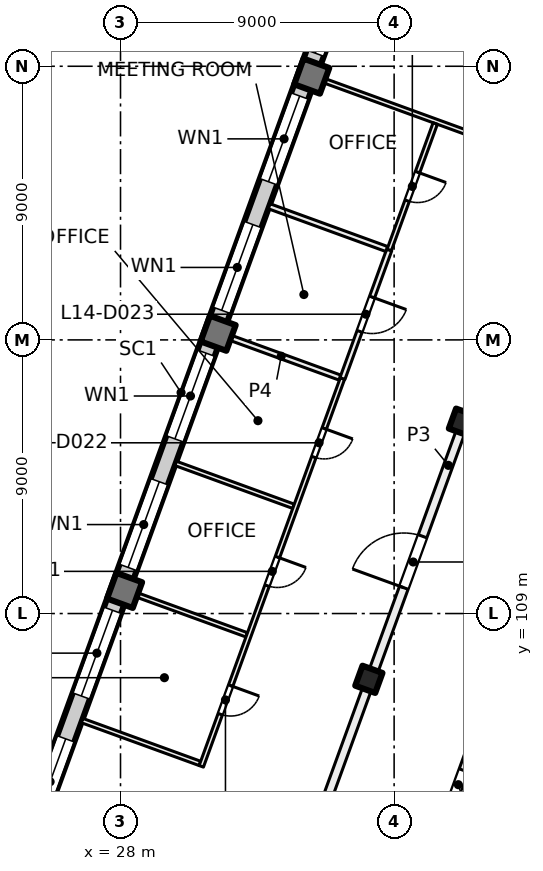
"""IFC4 building model, lengths in metres.
Left out: names, types, materials, properties, quantities, classifications, styles, units other than length and angle.
Written with IfcOpenShell. Run it as: python <this file> out.ifc"""

import sys

from ifc_helpers import new_model, si_unit, direction, frame, frame_2d, origin, origin_2d, place, context, subcontext, project, spatial, rectangle, extrude, element, fill, save


model = new_model("IFC4")
c1 = context("Model", 3, precision=1e-05, world=origin(), true_north=direction((0.0, 1.0)))
c2 = subcontext(c1, "Body", "Model", "MODEL_VIEW")
j1 = project(units=[si_unit("LENGTHUNIT", "METRE"), si_unit("PLANEANGLEUNIT", "RADIAN")], contexts=[c1])
p1 = place(None, origin())
s1 = spatial("IfcSite", under=j1, at=p1, CompositionType="ELEMENT")
p2 = place(p1, origin())
s2 = spatial("IfcBuilding", under=s1, at=p2, CompositionType="ELEMENT")
p3 = place(p2, frame((0.0, 0.0, 63.5)))
s3 = spatial("IfcBuildingStorey", under=s2, at=p3, CompositionType="ELEMENT", Elevation=63.5)
for number, where, z_axis, x_axis in (
    (1, (39.247, 115.293, 0.0), (0.0, 0.0, 1.0), (-0.342, -0.94, 0.0)),
    (2, (36.169, 106.836, 0.0), (0.0, 0.0, 1.0), (-0.342, -0.94, 0.0)),
):
    element("IfcColumn", number, at=place(p3, frame(where, z_axis=z_axis, x_axis=x_axis)), inside=s3, PredefinedType="COLUMN", context=c2, shape_type="SweptSolid", body=[
        extrude(rectangle(XDim=0.7, YDim=0.7, at=origin_2d()), origin(), (0.0, 0.0, 1.0), 4.0),
    ])
for number, where, z_axis, x_axis in (
    (3, (34.291, 126.675, 0.0), (0.0, 0.0, 1.0), (-0.342, -0.94, 0.0)),
    (4, (31.212, 118.218, 0.0), (0.0, 0.0, 1.0), (-0.342, -0.94, 0.0)),
    (5, (28.134, 109.76, 0.0), (0.0, 0.0, 1.0), (-0.342, -0.94, 0.0)),
):
    element("IfcColumn", number, at=place(p3, frame(where, z_axis=z_axis, x_axis=x_axis)), inside=s3, PredefinedType="COLUMN", context=c2, shape_type="SweptSolid", body=[
        extrude(rectangle(XDim=0.9, YDim=0.9, at=origin_2d()), origin(), (0.0, 0.0, 1.0), 4.0),
    ])
p4 = place(p3, frame((24.666, 100.669, 0.0), z_axis=(0.0, 0.0, 1.0), x_axis=(0.34201964167, 0.939692803373, 0.0)))
e6 = element("IfcWall", 6, at=p4, inside=s3, PredefinedType="SOLIDWALL", context=c2, shape_type="SweptSolid", body=[
    extrude(rectangle(XDim=32.884, YDim=0.6, at=frame_2d((16.442, 0.0))), origin(), (0.0, 0.0, 1.0), 3.625),
])
p5 = place(p4, frame((1.48, 0.0, 0.9)))
e7 = element("IfcOpeningElement", 7, at=p5, cuts=e6, PredefinedType="OPENING", context=c2, shape_type="SweptSolid", body=[
    extrude(rectangle(XDim=3.0, YDim=2.4, at=frame_2d((1.5, 1.2))), frame((0.0, 0.31, 0.0), z_axis=(0.0, -1.0, 0.0), x_axis=(1.0, 0.0, 0.0)), (0.0, 0.0, 1.0), 0.62),
])
p6 = place(p4, frame((5.98, 0.0, 0.9)))
e8 = element("IfcOpeningElement", 8, at=p6, cuts=e6, PredefinedType="OPENING", context=c2, shape_type="SweptSolid", body=[
    extrude(rectangle(XDim=3.0, YDim=2.4, at=frame_2d((1.5, 1.2))), frame((0.0, 0.31, 0.0), z_axis=(0.0, -1.0, 0.0), x_axis=(1.0, 0.0, 0.0)), (0.0, 0.0, 1.0), 0.62),
])
p7 = place(p4, frame((10.48, 0.0, 0.9)))
e9 = element("IfcOpeningElement", 9, at=p7, cuts=e6, PredefinedType="OPENING", context=c2, shape_type="SweptSolid", body=[
    extrude(rectangle(XDim=3.0, YDim=2.4, at=frame_2d((1.5, 1.2))), frame((0.0, 0.31, 0.0), z_axis=(0.0, -1.0, 0.0), x_axis=(1.0, 0.0, 0.0)), (0.0, 0.0, 1.0), 0.62),
])
p8 = place(p4, frame((14.98, 0.0, 0.9)))
e10 = element("IfcOpeningElement", 10, at=p8, cuts=e6, PredefinedType="OPENING", context=c2, shape_type="SweptSolid", body=[
    extrude(rectangle(XDim=3.0, YDim=2.4, at=frame_2d((1.5, 1.2))), frame((0.0, 0.31, 0.0), z_axis=(0.0, -1.0, 0.0), x_axis=(1.0, 0.0, 0.0)), (0.0, 0.0, 1.0), 0.62),
])
p9 = place(p4, frame((19.48, 0.0, 0.9)))
e11 = element("IfcOpeningElement", 11, at=p9, cuts=e6, PredefinedType="OPENING", context=c2, shape_type="SweptSolid", body=[
    extrude(rectangle(XDim=3.0, YDim=2.4, at=frame_2d((1.5, 1.2))), frame((0.0, 0.31, 0.0), z_axis=(0.0, -1.0, 0.0), x_axis=(1.0, 0.0, 0.0)), (0.0, 0.0, 1.0), 0.62),
])
p10 = place(p4, frame((23.98, 0.0, 0.9)))
e12 = element("IfcOpeningElement", 12, at=p10, cuts=e6, PredefinedType="OPENING", context=c2, shape_type="SweptSolid", body=[
    extrude(rectangle(XDim=3.0, YDim=2.4, at=frame_2d((1.5, 1.2))), frame((0.0, 0.31, 0.0), z_axis=(0.0, -1.0, 0.0), x_axis=(1.0, 0.0, 0.0)), (0.0, 0.0, 1.0), 0.62),
])
p11 = place(p4, frame((28.48, 0.0, 0.9)))
e13 = element("IfcOpeningElement", 13, at=p11, cuts=e6, PredefinedType="OPENING", context=c2, shape_type="SweptSolid", body=[
    extrude(rectangle(XDim=3.0, YDim=2.4, at=frame_2d((1.5, 1.2))), frame((0.0, 0.31, 0.0), z_axis=(0.0, -1.0, 0.0), x_axis=(1.0, 0.0, 0.0)), (0.0, 0.0, 1.0), 0.62),
])
p12 = place(p3, frame((26.736, 105.48, 0.0), z_axis=(0.0, 0.0, 1.0), x_axis=(0.939784783713, -0.341766821533, 0.0)))
e14 = element("IfcWall", 14, at=p12, inside=s3, PredefinedType="PARTITIONING", context=c2, shape_type="SweptSolid", body=[
    extrude(rectangle(XDim=4.125, YDim=0.15, at=frame_2d((2.062, 0.0))), origin(), (0.0, 0.0, 1.0), 3.625),
])
p13 = place(p3, frame((28.275, 109.709, 0.0), z_axis=(0.0, 0.0, 1.0), x_axis=(0.939791695678, -0.341747814529, 0.0)))
e15 = element("IfcWall", 15, at=p13, inside=s3, PredefinedType="PARTITIONING", context=c2, shape_type="SweptSolid", body=[
    extrude(rectangle(XDim=4.125, YDim=0.15, at=frame_2d((2.063, 0.0))), origin(), (0.0, 0.0, 1.0), 3.625),
])
p14 = place(p3, frame((29.814, 113.938, 0.0), z_axis=(0.0, 0.0, 1.0), x_axis=(0.93970873465, -0.341975867603, 0.0)))
e16 = element("IfcWall", 16, at=p14, inside=s3, PredefinedType="PARTITIONING", context=c2, shape_type="SweptSolid", body=[
    extrude(rectangle(XDim=4.126, YDim=0.15, at=frame_2d((2.063, 0.0))), origin(), (0.0, 0.0, 1.0), 3.625),
])
p15 = place(p3, frame((35.3, 116.73, 0.0), z_axis=(0.0, 0.0, 1.0), x_axis=(-0.342040522051, -0.939685203286, 0.0)))
e17 = element("IfcWall", 17, at=p15, inside=s3, PredefinedType="PARTITIONING", context=c2, shape_type="SweptSolid", body=[
    extrude(rectangle(XDim=13.575, YDim=0.15, at=frame_2d((6.787, 0.0))), origin(), (0.0, 0.0, 1.0), 3.625),
])
p16 = place(p15, frame((10.75, 0.0, 0.0)))
e18 = element("IfcOpeningElement", 18, at=p16, cuts=e17, PredefinedType="OPENING", context=c2, shape_type="SweptSolid", body=[
    extrude(rectangle(XDim=1.0, YDim=2.1, at=frame_2d((0.5, 1.05))), frame((0.0, 0.085, 0.0), z_axis=(0.0, -1.0, 0.0), x_axis=(1.0, 0.0, 0.0)), (0.0, 0.0, 1.0), 0.17),
])
p17 = place(p15, frame((6.25, 0.0, 0.0)))
e19 = element("IfcOpeningElement", 19, at=p17, cuts=e17, PredefinedType="OPENING", context=c2, shape_type="SweptSolid", body=[
    extrude(rectangle(XDim=1.0, YDim=2.1, at=frame_2d((0.5, 1.05))), frame((0.0, 0.085, 0.0), z_axis=(0.0, -1.0, 0.0), x_axis=(1.0, 0.0, 0.0)), (0.0, 0.0, 1.0), 0.17),
])
p18 = place(p15, frame((1.75, 0.0, 0.0)))
e20 = element("IfcOpeningElement", 20, at=p18, cuts=e17, PredefinedType="OPENING", context=c2, shape_type="SweptSolid", body=[
    extrude(rectangle(XDim=1.0, YDim=2.1, at=frame_2d((0.5, 1.05))), frame((0.0, 0.085, 0.0), z_axis=(0.0, -1.0, 0.0), x_axis=(1.0, 0.0, 0.0)), (0.0, 0.0, 1.0), 0.17),
])
p19 = place(p3, frame((31.353, 118.166, 0.0), z_axis=(0.0, 0.0, 1.0), x_axis=(0.939750086456, -0.341862216405, 0.0)))
e21 = element("IfcWall", 21, at=p19, inside=s3, PredefinedType="PARTITIONING", context=c2, shape_type="SweptSolid", body=[
    extrude(rectangle(XDim=4.113, YDim=0.175, at=frame_2d((2.056, 0.0))), origin(), (0.0, 0.0, 1.0), 3.625),
])
p20 = place(p3, frame((32.881, 97.657, 0.0), z_axis=(0.0, 0.0, 1.0), x_axis=(0.342017360004, 0.939693633828, 0.0)))
e22 = element("IfcWall", 22, at=p20, inside=s3, PredefinedType="PARTITIONING", context=c2, shape_type="SweptSolid", body=[
    extrude(rectangle(XDim=34.516, YDim=0.3, at=frame_2d((17.258, 0.0))), origin(), (0.0, 0.0, 1.0), 3.625),
])
p21 = place(p20, frame((12.975, 0.0, 0.0)))
e23 = element("IfcOpeningElement", 23, at=p21, cuts=e22, PredefinedType="OPENING", context=c2, shape_type="SweptSolid", body=[
    extrude(rectangle(XDim=1.8, YDim=2.1, at=frame_2d((0.9, 1.05))), frame((0.0, 0.16, 0.0), z_axis=(0.0, -1.0, 0.0), x_axis=(1.0, 0.0, 0.0)), (0.0, 0.0, 1.0), 0.32),
])
p22 = place(p3, frame((34.431, 126.624, 0.0), z_axis=(0.0, 0.0, 1.0), x_axis=(0.939687752599, -0.342033518263, 0.0)))
e24 = element("IfcWall", 24, at=p22, inside=s3, PredefinedType="PARTITIONING", context=c2, shape_type="SweptSolid", body=[
    extrude(rectangle(XDim=8.301, YDim=0.15, at=frame_2d((4.15, 0.0))), origin(), (0.0, 0.0, 1.0), 3.625),
])
p23 = place(p3, frame((36.839, 120.959, 0.0), z_axis=(0.0, 0.0, 1.0), x_axis=(-0.341986974999, -0.939704692407, 0.0)))
e25 = element("IfcWall", 25, at=p23, inside=s3, PredefinedType="PARTITIONING", context=c2, shape_type="SweptSolid", body=[
    extrude(rectangle(XDim=4.5, YDim=0.175, at=frame_2d((2.25, 0.0))), origin(), (0.0, 0.0, 1.0), 3.625),
])
p24 = place(p23, frame((1.65, 0.0, 0.0)))
e26 = element("IfcOpeningElement", 26, at=p24, cuts=e25, PredefinedType="OPENING", context=c2, shape_type="SweptSolid", body=[
    extrude(rectangle(XDim=1.2, YDim=2.1, at=frame_2d((0.6, 1.05))), frame((0.0, 0.097, 0.0), z_axis=(0.0, -1.0, 0.0), x_axis=(1.0, 0.0, 0.0)), (0.0, 0.0, 1.0), 0.195),
])
p25 = place(p3, frame((36.757, 120.989, 0.0), z_axis=(0.0, 0.0, 1.0), x_axis=(-0.939750086456, 0.341862216405, 0.0)))
e27 = element("IfcWall", 27, at=p25, inside=s3, PredefinedType="PARTITIONING", context=c2, shape_type="SweptSolid", body=[
    extrude(rectangle(XDim=4.113, YDim=0.175, at=frame_2d((2.056, 0.0))), origin(), (0.0, 0.0, 1.0), 3.625),
])
p26 = place(p3, frame((38.352, 125.117, 0.0), z_axis=(0.0, 0.0, 1.0), x_axis=(-0.34193355862, -0.939724130524, 0.0)))
e28 = element("IfcWall", 28, at=p26, inside=s3, PredefinedType="PARTITIONING", context=c2, shape_type="SweptSolid", body=[
    extrude(rectangle(XDim=4.425, YDim=0.15, at=frame_2d((2.212, 0.0))), origin(), (0.0, 0.0, 1.0), 3.625),
])
p27 = place(p26, frame((1.702, 0.0, 0.0)))
e29 = element("IfcOpeningElement", 29, at=p27, cuts=e28, PredefinedType="OPENING", context=c2, shape_type="SweptSolid", body=[
    extrude(rectangle(XDim=1.0, YDim=2.1, at=frame_2d((0.5, 1.05))), frame((0.0, 0.085, 0.0), z_axis=(0.0, -1.0, 0.0), x_axis=(1.0, 0.0, 0.0)), (0.0, 0.0, 1.0), 0.17),
])
p28 = place(p3, frame((47.314, 125.909, 0.0), z_axis=(0.0, 0.0, 1.0), x_axis=(-0.342010770371, -0.939696032209, 0.0)))
e30 = element("IfcWall", 30, at=p28, inside=s3, PredefinedType="PARTITIONING", context=c2, shape_type="SweptSolid", body=[
    extrude(rectangle(XDim=31.485, YDim=0.3, at=frame_2d((15.742, 0.0))), origin(), (0.0, 0.0, 1.0), 3.625),
])
p29 = place(p28, frame((28.259, 0.0, 0.0)))
e31 = element("IfcOpeningElement", 31, at=p29, cuts=e30, PredefinedType="OPENING", context=c2, shape_type="SweptSolid", body=[
    extrude(rectangle(XDim=1.2, YDim=2.1, at=frame_2d((0.6, 1.05))), frame((0.0, 0.16, 0.0), z_axis=(0.0, -1.0, 0.0), x_axis=(1.0, 0.0, 0.0)), (0.0, 0.0, 1.0), 0.32),
])
p30 = place(p28, frame((23.484, 0.0, 0.0)))
e32 = element("IfcOpeningElement", 32, at=p30, cuts=e30, PredefinedType="OPENING", context=c2, shape_type="SweptSolid", body=[
    extrude(rectangle(XDim=1.0, YDim=2.1, at=frame_2d((0.5, 1.05))), frame((0.0, 0.16, 0.0), z_axis=(0.0, -1.0, 0.0), x_axis=(1.0, 0.0, 0.0)), (0.0, 0.0, 1.0), 0.32),
])
p31 = place(p28, frame((18.984, 0.0, 0.0)))
e33 = element("IfcOpeningElement", 33, at=p31, cuts=e30, PredefinedType="OPENING", context=c2, shape_type="SweptSolid", body=[
    extrude(rectangle(XDim=1.0, YDim=2.1, at=frame_2d((0.5, 1.05))), frame((0.0, 0.16, 0.0), z_axis=(0.0, -1.0, 0.0), x_axis=(1.0, 0.0, 0.0)), (0.0, 0.0, 1.0), 0.32),
])
p32 = place(p28, frame((14.385, 0.0, 0.0)))
e34 = element("IfcOpeningElement", 34, at=p32, cuts=e30, PredefinedType="OPENING", context=c2, shape_type="SweptSolid", body=[
    extrude(rectangle(XDim=1.2, YDim=2.1, at=frame_2d((0.6, 1.05))), frame((0.0, 0.16, 0.0), z_axis=(0.0, -1.0, 0.0), x_axis=(1.0, 0.0, 0.0)), (0.0, 0.0, 1.0), 0.32),
])
p33 = place(p28, frame((9.885, 0.0, 0.0)))
e35 = element("IfcOpeningElement", 35, at=p33, cuts=e30, PredefinedType="OPENING", context=c2, shape_type="SweptSolid", body=[
    extrude(rectangle(XDim=1.2, YDim=2.1, at=frame_2d((0.6, 1.05))), frame((0.0, 0.16, 0.0), z_axis=(0.0, -1.0, 0.0), x_axis=(1.0, 0.0, 0.0)), (0.0, 0.0, 1.0), 0.32),
])
p34 = place(p28, frame((5.384, 0.0, 0.0)))
e36 = element("IfcOpeningElement", 36, at=p34, cuts=e30, PredefinedType="OPENING", context=c2, shape_type="SweptSolid", body=[
    extrude(rectangle(XDim=1.2, YDim=2.1, at=frame_2d((0.6, 1.05))), frame((0.0, 0.16, 0.0), z_axis=(0.0, -1.0, 0.0), x_axis=(1.0, 0.0, 0.0)), (0.0, 0.0, 1.0), 0.32),
])
p35 = place(p5, origin())
e37 = element("IfcWindow", 37, at=p35, inside=s3, PartitioningType="SINGLE_PANEL", PredefinedType="WINDOW", context=c2, shape_type="SweptSolid", body=[
    extrude(rectangle(XDim=3.0, YDim=2.4, at=frame_2d((1.5, 1.2))), frame((0.0, 0.03, 0.0), z_axis=(0.0, -1.0, 0.0), x_axis=(1.0, 0.0, 0.0)), (0.0, 0.0, 1.0), 0.06),
])
fill(e7, e37)
p36 = place(p6, origin())
e38 = element("IfcWindow", 38, at=p36, inside=s3, PartitioningType="SINGLE_PANEL", PredefinedType="WINDOW", context=c2, shape_type="SweptSolid", body=[
    extrude(rectangle(XDim=3.0, YDim=2.4, at=frame_2d((1.5, 1.2))), frame((0.0, 0.03, 0.0), z_axis=(0.0, -1.0, 0.0), x_axis=(1.0, 0.0, 0.0)), (0.0, 0.0, 1.0), 0.06),
])
fill(e8, e38)
p37 = place(p7, origin())
e39 = element("IfcWindow", 39, at=p37, inside=s3, PartitioningType="SINGLE_PANEL", PredefinedType="WINDOW", context=c2, shape_type="SweptSolid", body=[
    extrude(rectangle(XDim=3.0, YDim=2.4, at=frame_2d((1.5, 1.2))), frame((0.0, 0.03, 0.0), z_axis=(0.0, -1.0, 0.0), x_axis=(1.0, 0.0, 0.0)), (0.0, 0.0, 1.0), 0.06),
])
fill(e9, e39)
p38 = place(p8, origin())
e40 = element("IfcWindow", 40, at=p38, inside=s3, PartitioningType="SINGLE_PANEL", PredefinedType="WINDOW", context=c2, shape_type="SweptSolid", body=[
    extrude(rectangle(XDim=3.0, YDim=2.4, at=frame_2d((1.5, 1.2))), frame((0.0, 0.03, 0.0), z_axis=(0.0, -1.0, 0.0), x_axis=(1.0, 0.0, 0.0)), (0.0, 0.0, 1.0), 0.06),
])
fill(e10, e40)
p39 = place(p9, origin())
e41 = element("IfcWindow", 41, at=p39, inside=s3, PartitioningType="SINGLE_PANEL", PredefinedType="WINDOW", context=c2, shape_type="SweptSolid", body=[
    extrude(rectangle(XDim=3.0, YDim=2.4, at=frame_2d((1.5, 1.2))), frame((0.0, 0.03, 0.0), z_axis=(0.0, -1.0, 0.0), x_axis=(1.0, 0.0, 0.0)), (0.0, 0.0, 1.0), 0.06),
])
fill(e11, e41)
p40 = place(p10, origin())
e42 = element("IfcWindow", 42, at=p40, inside=s3, PartitioningType="SINGLE_PANEL", PredefinedType="WINDOW", context=c2, shape_type="SweptSolid", body=[
    extrude(rectangle(XDim=3.0, YDim=2.4, at=frame_2d((1.5, 1.2))), frame((0.0, 0.03, 0.0), z_axis=(0.0, -1.0, 0.0), x_axis=(1.0, 0.0, 0.0)), (0.0, 0.0, 1.0), 0.06),
])
fill(e12, e42)
p41 = place(p11, origin())
e43 = element("IfcWindow", 43, at=p41, inside=s3, PartitioningType="SINGLE_PANEL", PredefinedType="WINDOW", context=c2, shape_type="SweptSolid", body=[
    extrude(rectangle(XDim=3.0, YDim=2.4, at=frame_2d((1.5, 1.2))), frame((0.0, 0.03, 0.0), z_axis=(0.0, -1.0, 0.0), x_axis=(1.0, 0.0, 0.0)), (0.0, 0.0, 1.0), 0.06),
])
fill(e13, e43)
p42 = place(p16, origin())
e44 = element("IfcDoor", 44, at=p42, inside=s3, OperationType="SINGLE_SWING_LEFT", PredefinedType="DOOR", context=c2, shape_type="SweptSolid", body=[
    extrude(rectangle(XDim=1.0, YDim=2.1, at=frame_2d((0.5, 1.05))), frame((0.0, 0.025, 0.0), z_axis=(0.0, -1.0, 0.0), x_axis=(1.0, 0.0, 0.0)), (0.0, 0.0, 1.0), 0.05),
])
fill(e18, e44)
p43 = place(p17, origin())
e45 = element("IfcDoor", 45, at=p43, inside=s3, OperationType="SINGLE_SWING_LEFT", PredefinedType="DOOR", context=c2, shape_type="SweptSolid", body=[
    extrude(rectangle(XDim=1.0, YDim=2.1, at=frame_2d((0.5, 1.05))), frame((0.0, 0.025, 0.0), z_axis=(0.0, -1.0, 0.0), x_axis=(1.0, 0.0, 0.0)), (0.0, 0.0, 1.0), 0.05),
])
fill(e19, e45)
p44 = place(p18, origin())
e46 = element("IfcDoor", 46, at=p44, inside=s3, OperationType="SINGLE_SWING_LEFT", PredefinedType="DOOR", context=c2, shape_type="SweptSolid", body=[
    extrude(rectangle(XDim=1.0, YDim=2.1, at=frame_2d((0.5, 1.05))), frame((0.0, 0.025, 0.0), z_axis=(0.0, -1.0, 0.0), x_axis=(1.0, 0.0, 0.0)), (0.0, 0.0, 1.0), 0.05),
])
fill(e20, e46)
p45 = place(p24, origin())
e47 = element("IfcDoor", 47, at=p45, inside=s3, OperationType="DOUBLE_DOOR_SINGLE_SWING", PredefinedType="DOOR", context=c2, shape_type="SweptSolid", body=[
    extrude(rectangle(XDim=1.2, YDim=2.1, at=frame_2d((0.6, 1.05))), frame((0.0, 0.025, 0.0), z_axis=(0.0, -1.0, 0.0), x_axis=(1.0, 0.0, 0.0)), (0.0, 0.0, 1.0), 0.05),
])
fill(e26, e47)
p46 = place(p27, origin())
e48 = element("IfcDoor", 48, at=p46, inside=s3, OperationType="SINGLE_SWING_RIGHT", PredefinedType="DOOR", context=c2, shape_type="SweptSolid", body=[
    extrude(rectangle(XDim=1.0, YDim=2.1, at=frame_2d((0.5, 1.05))), frame((0.0, 0.025, 0.0), z_axis=(0.0, -1.0, 0.0), x_axis=(1.0, 0.0, 0.0)), (0.0, 0.0, 1.0), 0.05),
])
fill(e29, e48)
p47 = place(p21, origin())
e49 = element("IfcDoor", 49, at=p47, inside=s3, OperationType="DOUBLE_DOOR_SINGLE_SWING", PredefinedType="DOOR", context=c2, shape_type="SweptSolid", body=[
    extrude(rectangle(XDim=1.8, YDim=2.1, at=frame_2d((0.9, 1.05))), frame((0.0, 0.025, 0.0), z_axis=(0.0, -1.0, 0.0), x_axis=(1.0, 0.0, 0.0)), (0.0, 0.0, 1.0), 0.05),
])
fill(e23, e49)
p48 = place(p30, origin())
e50 = element("IfcDoor", 50, at=p48, inside=s3, OperationType="SINGLE_SWING_LEFT", PredefinedType="DOOR", context=c2, shape_type="SweptSolid", body=[
    extrude(rectangle(XDim=1.0, YDim=2.1, at=frame_2d((0.5, 1.05))), frame((0.0, 0.025, 0.0), z_axis=(0.0, -1.0, 0.0), x_axis=(1.0, 0.0, 0.0)), (0.0, 0.0, 1.0), 0.05),
])
fill(e32, e50)
save(model, sys.argv[1])
